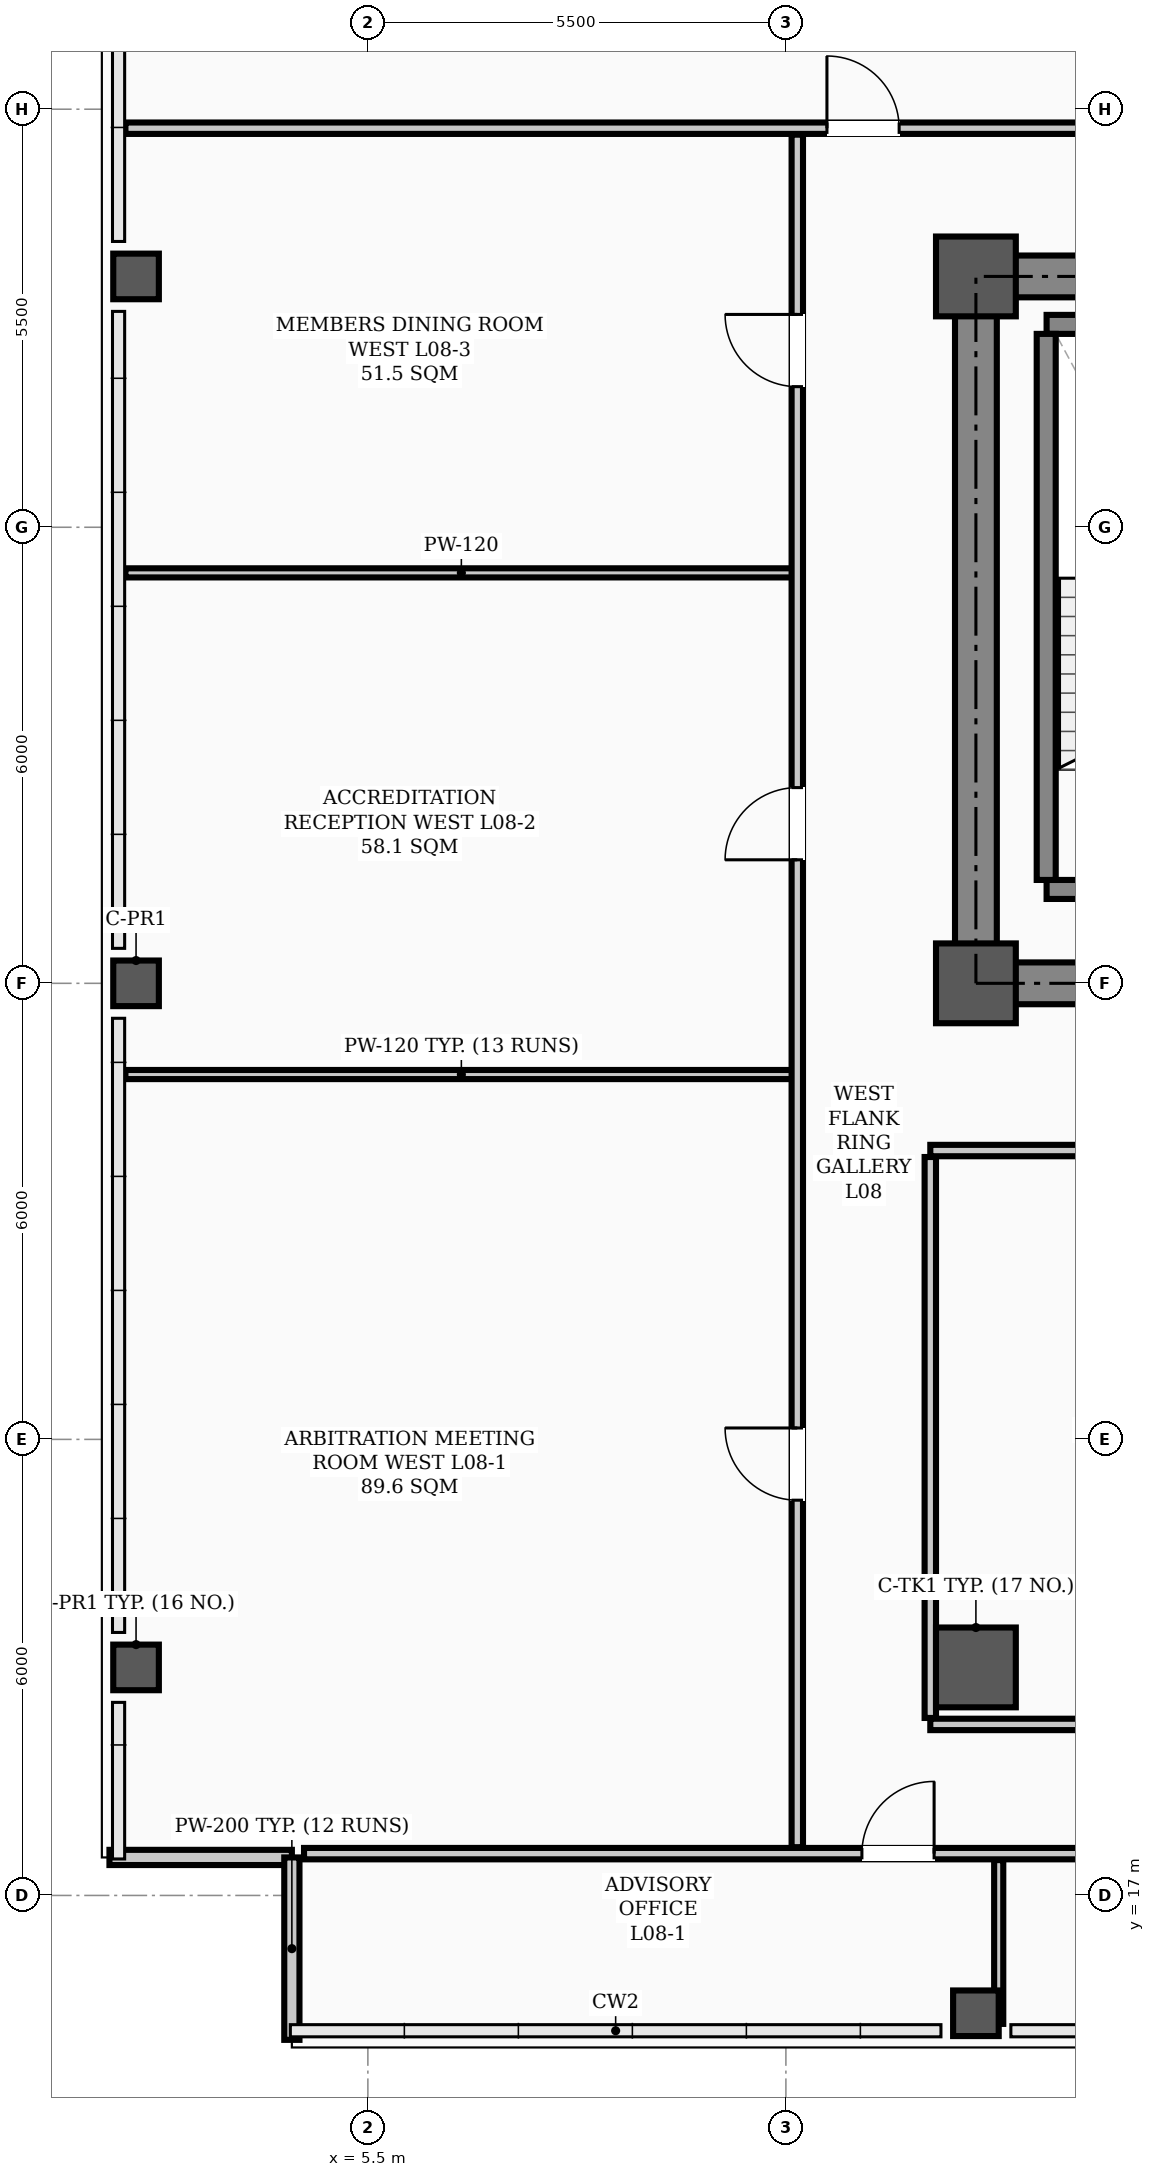
"""IFC4 building model, lengths in metres.
Left out: names, types, materials, properties, quantities, classifications, styles, units other than length and angle.
Written with IfcOpenShell. Run it as: python <this file> out.ifc"""

import sys

from ifc_helpers import new_model, si_unit, direction, frame, frame_2d, origin, origin_2d, place, context, subcontext, project, spatial, rectangle, hollow_rectangle, extrude, element, fill, save


model = new_model("IFC4")
c1 = context("Model", 3, precision=1e-05, world=origin(), true_north=direction((0.0, 1.0)))
c2 = subcontext(c1, "Body", "Model", "MODEL_VIEW")
j1 = project(units=[si_unit("LENGTHUNIT", "METRE"), si_unit("PLANEANGLEUNIT", "RADIAN")], contexts=[c1])
p1 = place(None, origin())
s1 = spatial("IfcSite", under=j1, at=p1, CompositionType="ELEMENT")
p2 = place(p1, origin())
s2 = spatial("IfcBuilding", under=s1, at=p2, CompositionType="ELEMENT")
p3 = place(p2, frame((0.0, 0.0, 34.3)))
s3 = spatial("IfcBuildingStorey", under=s2, at=p3, CompositionType="ELEMENT", Elevation=34.3)
for number, where, z_axis, x_axis in (
    (1, (13.5, 29.0, 0.0), (0.0, 0.0, 1.0), (1.0, 0.0, 0.0)),
    (2, (13.5, 38.3, 0.0), (0.0, 0.0, 1.0), (1.0, 0.0, 0.0)),
    (3, (13.5, 20.0, 0.0), (0.0, 0.0, 1.0), (1.0, 0.0, 0.0)),
):
    element("IfcColumn", number, at=place(p3, frame(where, z_axis=z_axis, x_axis=x_axis)), inside=s3, PredefinedType="COLUMN", context=c2, shape_type="SweptSolid", body=[
        extrude(hollow_rectangle(XDim=1.05, YDim=1.05, WallThickness=0.038, InnerFilletRadius=0.019, OuterFilletRadius=0.057, at=origin_2d()), origin(), (0.0, 0.0, 1.0), 3.9),
    ])
for number, where, z_axis, x_axis in (
    (4, (2.45, 20.0, 0.0), (0.0, 0.0, 1.0), (1.0, 0.0, 0.0)),
    (5, (2.45, 29.0, 0.0), (0.0, 0.0, 1.0), (1.0, 0.0, 0.0)),
    (6, (2.45, 38.3, 0.0), (0.0, 0.0, 1.0), (1.0, 0.0, 0.0)),
    (7, (13.5, 15.45, 0.0), (0.0, 0.0, 1.0), (1.0, 0.0, 0.0)),
):
    element("IfcColumn", number, at=place(p3, frame(where, z_axis=z_axis, x_axis=x_axis)), inside=s3, PredefinedType="COLUMN", context=c2, shape_type="SweptSolid", body=[
        extrude(hollow_rectangle(XDim=0.6, YDim=0.6, WallThickness=0.026, InnerFilletRadius=0.013, OuterFilletRadius=0.039, at=origin_2d()), origin(), (0.0, 0.0, 1.0), 3.9),
    ])
for number, where, z_axis, x_axis in (
    (8, (2.1, 17.5, 0.0), (0.0, 0.0, 1.0), (1.0, 0.0, 0.0)),
    (9, (4.5, 17.5, 0.0), (0.0, 0.0, 1.0), (0.0, -1.0, 0.0)),
):
    element("IfcWall", number, at=place(p3, frame(where, z_axis=z_axis, x_axis=x_axis)), inside=s3, PredefinedType="PARAPET", context=c2, shape_type="SweptSolid", body=[
        extrude(rectangle(XDim=2.4, YDim=0.2, at=frame_2d((1.2, 0.0))), origin(), (0.0, 0.0, 1.0), 1.2),
    ])
p4 = place(p3, frame((13.5, 29.0, 0.0), z_axis=(0.0, 0.0, 1.0), x_axis=(1.0, 0.0, 0.0)))
e10 = element("IfcWall", 10, at=p4, inside=s3, PredefinedType="SHEAR", context=c2, shape_type="SweptSolid", body=[
    extrude(rectangle(XDim=30.5, YDim=0.55, at=frame_2d((15.25, 0.0))), origin(), (0.0, 0.0, 1.0), 3.72),
])
p5 = place(p4, frame((1.75, 0.0, 0.0)))
e11 = element("IfcOpeningElement", 11, at=p5, cuts=e10, PredefinedType="OPENING", context=c2, shape_type="SweptSolid", body=[
    extrude(rectangle(XDim=1.1, YDim=2.08, at=frame_2d((0.55, 1.04))), frame((0.0, 0.285, 0.0), z_axis=(0.0, -1.0, 0.0), x_axis=(1.0, 0.0, 0.0)), (0.0, 0.0, 1.0), 0.57),
])
p6 = place(p4, frame((26.7, 0.0, 0.0)))
e12 = element("IfcOpeningElement", 12, at=p6, cuts=e10, PredefinedType="OPENING", context=c2, shape_type="SweptSolid", body=[
    extrude(rectangle(XDim=1.1, YDim=2.08, at=frame_2d((0.55, 1.04))), frame((0.0, 0.285, 0.0), z_axis=(0.0, -1.0, 0.0), x_axis=(1.0, 0.0, 0.0)), (0.0, 0.0, 1.0), 0.57),
])
p7 = place(p4, frame((6.8, 0.0, 0.0)))
e13 = element("IfcOpeningElement", 13, at=p7, cuts=e10, PredefinedType="OPENING", context=c2, shape_type="SweptSolid", body=[
    extrude(rectangle(XDim=1.1, YDim=2.08, at=frame_2d((0.55, 1.04))), frame((0.0, 0.285, 0.0), z_axis=(0.0, -1.0, 0.0), x_axis=(1.0, 0.0, 0.0)), (0.0, 0.0, 1.0), 0.57),
])
p8 = place(p4, frame((13.2, 0.0, 0.0)))
e14 = element("IfcOpeningElement", 14, at=p8, cuts=e10, PredefinedType="OPENING", context=c2, shape_type="SweptSolid", body=[
    extrude(rectangle(XDim=1.6, YDim=2.08, at=frame_2d((0.8, 1.04))), frame((0.0, 0.285, 0.0), z_axis=(0.0, -1.0, 0.0), x_axis=(1.0, 0.0, 0.0)), (0.0, 0.0, 1.0), 0.57),
])
p9 = place(p4, frame((19.53, 0.0, 0.0)))
e15 = element("IfcOpeningElement", 15, at=p9, cuts=e10, PredefinedType="OPENING", context=c2, shape_type="SweptSolid", body=[
    extrude(rectangle(XDim=0.9, YDim=2.08, at=frame_2d((0.45, 1.04))), frame((0.0, 0.285, 0.0), z_axis=(0.0, -1.0, 0.0), x_axis=(1.0, 0.0, 0.0)), (0.0, 0.0, 1.0), 0.57),
])
p10 = place(p4, frame((21.57, 0.0, 0.0)))
e16 = element("IfcOpeningElement", 16, at=p10, cuts=e10, PredefinedType="OPENING", context=c2, shape_type="SweptSolid", body=[
    extrude(rectangle(XDim=0.9, YDim=2.08, at=frame_2d((0.45, 1.04))), frame((0.0, 0.285, 0.0), z_axis=(0.0, -1.0, 0.0), x_axis=(1.0, 0.0, 0.0)), (0.0, 0.0, 1.0), 0.57),
])
p11 = place(p3, frame((13.5, 38.3, 0.0), z_axis=(0.0, 0.0, 1.0), x_axis=(1.0, 0.0, 0.0)))
e17 = element("IfcWall", 17, at=p11, inside=s3, PredefinedType="SHEAR", context=c2, shape_type="SweptSolid", body=[
    extrude(rectangle(XDim=30.5, YDim=0.55, at=frame_2d((15.25, 0.0))), origin(), (0.0, 0.0, 1.0), 3.72),
])
p12 = place(p3, frame((13.5, 29.35, 0.0), z_axis=(0.0, 0.0, 1.0), x_axis=(0.0, 1.0, 0.0)))
e18 = element("IfcWall", 18, at=p12, inside=s3, PredefinedType="SHEAR", context=c2, shape_type="SweptSolid", body=[
    extrude(rectangle(XDim=8.6, YDim=0.55, at=frame_2d((4.3, 0.0))), origin(), (0.0, 0.0, 1.0), 3.72),
])
p13 = place(p3, frame((14.43, 30.235, 0.0), z_axis=(0.0, 0.0, 1.0), x_axis=(1.0, 0.0, 0.0)))
e19 = element("IfcWall", 19, at=p13, inside=s3, PredefinedType="STANDARD", context=c2, shape_type="SweptSolid", body=[
    extrude(rectangle(XDim=3.34, YDim=0.25, at=frame_2d((1.67, 0.0))), origin(), (0.0, 0.0, 1.0), 3.72),
])
p14 = place(p13, frame((1.1, 0.0, 0.0)))
e20 = element("IfcOpeningElement", 20, at=p14, cuts=e19, PredefinedType="OPENING", context=c2, shape_type="SweptSolid", body=[
    extrude(rectangle(XDim=1.1, YDim=2.08, at=frame_2d((0.55, 1.04))), frame((0.0, 0.135, 0.0), z_axis=(0.0, -1.0, 0.0), x_axis=(1.0, 0.0, 0.0)), (0.0, 0.0, 1.0), 0.27),
])
p15 = place(p3, frame((14.43, 37.669, 0.0), z_axis=(0.0, 0.0, 1.0), x_axis=(1.0, 0.0, 0.0)))
e21 = element("IfcWall", 21, at=p15, inside=s3, PredefinedType="STANDARD", context=c2, shape_type="SweptSolid", body=[
    extrude(rectangle(XDim=3.34, YDim=0.25, at=frame_2d((1.67, 0.0))), origin(), (0.0, 0.0, 1.0), 3.72),
])
p16 = place(p3, frame((14.425, 30.36, 0.0), z_axis=(0.0, 0.0, 1.0), x_axis=(0.0, 1.0, 0.0)))
e22 = element("IfcWall", 22, at=p16, inside=s3, PredefinedType="STANDARD", context=c2, shape_type="SweptSolid", body=[
    extrude(rectangle(XDim=7.184, YDim=0.25, at=frame_2d((3.592, 0.0))), origin(), (0.0, 0.0, 1.0), 3.72),
])
p17 = place(p3, frame((12.9, 26.8, 0.0), z_axis=(0.0, 0.0, 1.0), x_axis=(1.0, 0.0, 0.0)))
e23 = element("IfcWall", 23, at=p17, inside=s3, PredefinedType="PARTITIONING", context=c2, shape_type="SweptSolid", body=[
    extrude(rectangle(XDim=31.7, YDim=0.15, at=frame_2d((15.85, 0.0))), origin(), (0.0, 0.0, 1.0), 3.1),
])
p18 = place(p17, frame((13.6, 0.0, 0.0)))
e24 = element("IfcOpeningElement", 24, at=p18, cuts=e23, PredefinedType="OPENING", context=c2, shape_type="SweptSolid", body=[
    extrude(rectangle(XDim=1.6, YDim=2.08, at=frame_2d((0.8, 1.04))), frame((0.0, 0.085, 0.0), z_axis=(0.0, -1.0, 0.0), x_axis=(1.0, 0.0, 0.0)), (0.0, 0.0, 1.0), 0.17),
])
p19 = place(p17, frame((2.875, 0.0, 0.0)))
e25 = element("IfcOpeningElement", 25, at=p19, cuts=e23, PredefinedType="OPENING", context=c2, shape_type="SweptSolid", body=[
    extrude(rectangle(XDim=0.95, YDim=2.08, at=frame_2d((0.475, 1.04))), frame((0.0, 0.085, 0.0), z_axis=(0.0, -1.0, 0.0), x_axis=(1.0, 0.0, 0.0)), (0.0, 0.0, 1.0), 0.17),
])
p20 = place(p17, frame((8.625, 0.0, 0.0)))
e26 = element("IfcOpeningElement", 26, at=p20, cuts=e23, PredefinedType="OPENING", context=c2, shape_type="SweptSolid", body=[
    extrude(rectangle(XDim=0.95, YDim=2.08, at=frame_2d((0.475, 1.04))), frame((0.0, 0.085, 0.0), z_axis=(0.0, -1.0, 0.0), x_axis=(1.0, 0.0, 0.0)), (0.0, 0.0, 1.0), 0.17),
])
p21 = place(p17, frame((16.075, 0.0, 0.0)))
e27 = element("IfcOpeningElement", 27, at=p21, cuts=e23, PredefinedType="OPENING", context=c2, shape_type="SweptSolid", body=[
    extrude(rectangle(XDim=0.95, YDim=2.08, at=frame_2d((0.475, 1.04))), frame((0.0, 0.085, 0.0), z_axis=(0.0, -1.0, 0.0), x_axis=(1.0, 0.0, 0.0)), (0.0, 0.0, 1.0), 0.17),
])
p22 = place(p17, frame((21.875, 0.0, 0.0)))
e28 = element("IfcOpeningElement", 28, at=p22, cuts=e23, PredefinedType="OPENING", context=c2, shape_type="SweptSolid", body=[
    extrude(rectangle(XDim=0.95, YDim=2.08, at=frame_2d((0.475, 1.04))), frame((0.0, 0.085, 0.0), z_axis=(0.0, -1.0, 0.0), x_axis=(1.0, 0.0, 0.0)), (0.0, 0.0, 1.0), 0.17),
])
p23 = place(p17, frame((29.025, 0.0, 0.0)))
e29 = element("IfcOpeningElement", 29, at=p23, cuts=e23, PredefinedType="OPENING", context=c2, shape_type="SweptSolid", body=[
    extrude(rectangle(XDim=0.95, YDim=2.08, at=frame_2d((0.475, 1.04))), frame((0.0, 0.085, 0.0), z_axis=(0.0, -1.0, 0.0), x_axis=(1.0, 0.0, 0.0)), (0.0, 0.0, 1.0), 0.17),
])
p24 = place(p3, frame((4.66, 17.55, 0.0), z_axis=(0.0, 0.0, 1.0), x_axis=(1.0, 0.0, 0.0)))
e30 = element("IfcWall", 30, at=p24, inside=s3, PredefinedType="PARTITIONING", context=c2, shape_type="SweptSolid", body=[
    extrude(rectangle(XDim=44.68, YDim=0.15, at=frame_2d((22.34, 0.0))), origin(), (0.0, 0.0, 1.0), 3.1),
])
p25 = place(p24, frame((7.34, 0.0, 0.0)))
e31 = element("IfcOpeningElement", 31, at=p25, cuts=e30, PredefinedType="OPENING", context=c2, shape_type="SweptSolid", body=[
    extrude(rectangle(XDim=0.95, YDim=2.08, at=frame_2d((0.475, 1.04))), frame((0.0, 0.085, 0.0), z_axis=(0.0, -1.0, 0.0), x_axis=(1.0, 0.0, 0.0)), (0.0, 0.0, 1.0), 0.17),
])
p26 = place(p24, frame((12.465, 0.0, 0.0)))
e32 = element("IfcOpeningElement", 32, at=p26, cuts=e30, PredefinedType="OPENING", context=c2, shape_type="SweptSolid", body=[
    extrude(rectangle(XDim=0.95, YDim=2.08, at=frame_2d((0.475, 1.04))), frame((0.0, 0.085, 0.0), z_axis=(0.0, -1.0, 0.0), x_axis=(1.0, 0.0, 0.0)), (0.0, 0.0, 1.0), 0.17),
])
p27 = place(p24, frame((29.265, 0.0, 0.0)))
e33 = element("IfcOpeningElement", 33, at=p27, cuts=e30, PredefinedType="OPENING", context=c2, shape_type="SweptSolid", body=[
    extrude(rectangle(XDim=0.95, YDim=2.08, at=frame_2d((0.475, 1.04))), frame((0.0, 0.085, 0.0), z_axis=(0.0, -1.0, 0.0), x_axis=(1.0, 0.0, 0.0)), (0.0, 0.0, 1.0), 0.17),
])
p28 = place(p24, frame((37.265, 0.0, 0.0)))
e34 = element("IfcOpeningElement", 34, at=p28, cuts=e30, PredefinedType="OPENING", context=c2, shape_type="SweptSolid", body=[
    extrude(rectangle(XDim=0.95, YDim=2.08, at=frame_2d((0.475, 1.04))), frame((0.0, 0.085, 0.0), z_axis=(0.0, -1.0, 0.0), x_axis=(1.0, 0.0, 0.0)), (0.0, 0.0, 1.0), 0.17),
])
p29 = place(p3, frame((12.9, 19.25, 0.0), z_axis=(0.0, 0.0, 1.0), x_axis=(1.0, 0.0, 0.0)))
e35 = element("IfcWall", 35, at=p29, inside=s3, PredefinedType="PARTITIONING", context=c2, shape_type="SweptSolid", body=[
    extrude(rectangle(XDim=13.3, YDim=0.15, at=frame_2d((6.65, 0.0))), origin(), (0.0, 0.0, 1.0), 3.1),
])
for number, where, z_axis, x_axis in (
    (36, (2.31, 27.8, 0.0), (0.0, 0.0, 1.0), (1.0, 0.0, 0.0)),
    (37, (2.31, 34.4, 0.0), (0.0, 0.0, 1.0), (1.0, 0.0, 0.0)),
):
    element("IfcWall", number, at=place(p3, frame(where, z_axis=z_axis, x_axis=x_axis)), inside=s3, PredefinedType="PARTITIONING", context=c2, shape_type="SweptSolid", body=[
        extrude(rectangle(XDim=8.84, YDim=0.12, at=frame_2d((4.42, 0.0))), origin(), (0.0, 0.0, 1.0), 3.212),
    ])
p30 = place(p3, frame((2.31, 40.25, 0.0), z_axis=(0.0, 0.0, 1.0), x_axis=(1.0, 0.0, 0.0)))
e38 = element("IfcWall", 38, at=p30, inside=s3, PredefinedType="PARTITIONING", context=c2, shape_type="SweptSolid", body=[
    extrude(rectangle(XDim=49.38, YDim=0.15, at=frame_2d((24.69, 0.0))), origin(), (0.0, 0.0, 1.0), 3.1),
])
p31 = place(p30, frame((9.23, 0.0, 0.0)))
e39 = element("IfcOpeningElement", 39, at=p31, cuts=e38, PredefinedType="OPENING", context=c2, shape_type="SweptSolid", body=[
    extrude(rectangle(XDim=0.95, YDim=2.08, at=frame_2d((0.475, 1.04))), frame((0.0, 0.085, 0.0), z_axis=(0.0, -1.0, 0.0), x_axis=(1.0, 0.0, 0.0)), (0.0, 0.0, 1.0), 0.17),
])
p32 = place(p30, frame((23.115, 0.0, 0.0)))
e40 = element("IfcOpeningElement", 40, at=p32, cuts=e38, PredefinedType="OPENING", context=c2, shape_type="SweptSolid", body=[
    extrude(rectangle(XDim=0.95, YDim=2.08, at=frame_2d((0.475, 1.04))), frame((0.0, 0.085, 0.0), z_axis=(0.0, -1.0, 0.0), x_axis=(1.0, 0.0, 0.0)), (0.0, 0.0, 1.0), 0.17),
])
p33 = place(p30, frame((31.515, 0.0, 0.0)))
e41 = element("IfcOpeningElement", 41, at=p33, cuts=e38, PredefinedType="OPENING", context=c2, shape_type="SweptSolid", body=[
    extrude(rectangle(XDim=0.95, YDim=2.08, at=frame_2d((0.475, 1.04))), frame((0.0, 0.085, 0.0), z_axis=(0.0, -1.0, 0.0), x_axis=(1.0, 0.0, 0.0)), (0.0, 0.0, 1.0), 0.17),
])
p34 = place(p30, frame((42.7, 0.0, 0.0)))
e42 = element("IfcOpeningElement", 42, at=p34, cuts=e38, PredefinedType="OPENING", context=c2, shape_type="SweptSolid", body=[
    extrude(rectangle(XDim=0.95, YDim=2.08, at=frame_2d((0.475, 1.04))), frame((0.0, 0.085, 0.0), z_axis=(0.0, -1.0, 0.0), x_axis=(1.0, 0.0, 0.0)), (0.0, 0.0, 1.0), 0.17),
])
p35 = place(p3, frame((11.15, 17.635, 0.0), z_axis=(0.0, 0.0, 1.0), x_axis=(0.0, 1.0, 0.0)))
e43 = element("IfcWall", 43, at=p35, inside=s3, PredefinedType="PARTITIONING", context=c2, shape_type="SweptSolid", body=[
    extrude(rectangle(XDim=22.53, YDim=0.15, at=frame_2d((11.265, 0.0))), origin(), (0.0, 0.0, 1.0), 3.0),
])
p36 = place(p35, frame((4.565, 0.0, 0.0)))
e44 = element("IfcOpeningElement", 44, at=p36, cuts=e43, PredefinedType="OPENING", context=c2, shape_type="SweptSolid", body=[
    extrude(rectangle(XDim=0.95, YDim=2.08, at=frame_2d((0.475, 1.04))), frame((0.0, 0.085, 0.0), z_axis=(0.0, -1.0, 0.0), x_axis=(1.0, 0.0, 0.0)), (0.0, 0.0, 1.0), 0.17),
])
p37 = place(p35, frame((12.99, 0.0, 0.0)))
e45 = element("IfcOpeningElement", 45, at=p37, cuts=e43, PredefinedType="OPENING", context=c2, shape_type="SweptSolid", body=[
    extrude(rectangle(XDim=0.95, YDim=2.08, at=frame_2d((0.475, 1.04))), frame((0.0, 0.085, 0.0), z_axis=(0.0, -1.0, 0.0), x_axis=(1.0, 0.0, 0.0)), (0.0, 0.0, 1.0), 0.17),
])
p38 = place(p35, frame((19.215, 0.0, 0.0)))
e46 = element("IfcOpeningElement", 46, at=p38, cuts=e43, PredefinedType="OPENING", context=c2, shape_type="SweptSolid", body=[
    extrude(rectangle(XDim=0.95, YDim=2.08, at=frame_2d((0.475, 1.04))), frame((0.0, 0.085, 0.0), z_axis=(0.0, -1.0, 0.0), x_axis=(1.0, 0.0, 0.0)), (0.0, 0.0, 1.0), 0.17),
])
p39 = place(p3, frame((12.9, 19.335, 0.0), z_axis=(0.0, 0.0, 1.0), x_axis=(0.0, 1.0, 0.0)))
e47 = element("IfcWall", 47, at=p39, inside=s3, PredefinedType="PARTITIONING", context=c2, shape_type="SweptSolid", body=[
    extrude(rectangle(XDim=7.38, YDim=0.15, at=frame_2d((3.69, 0.0))), origin(), (0.0, 0.0, 1.0), 3.0),
])
p40 = place(p3, frame((13.8, 15.31, 0.0), z_axis=(0.0, 0.0, 1.0), x_axis=(0.0, 1.0, 0.0)))
e48 = element("IfcWall", 48, at=p40, inside=s3, PredefinedType="PARTITIONING", context=c2, shape_type="SweptSolid", body=[
    extrude(rectangle(XDim=2.155, YDim=0.12, at=frame_2d((1.078, 0.0))), origin(), (0.0, 0.0, 1.0), 3.1),
])
p41 = place(p25, origin())
e49 = element("IfcDoor", 49, at=p41, inside=s3, OperationType="SINGLE_SWING_RIGHT", PredefinedType="DOOR", context=c2, shape_type="SweptSolid", body=[
    extrude(rectangle(XDim=0.95, YDim=2.08, at=frame_2d((0.475, 1.04))), frame((0.0, 0.025, 0.0), z_axis=(0.0, -1.0, 0.0), x_axis=(1.0, 0.0, 0.0)), (0.0, 0.0, 1.0), 0.05),
])
fill(e31, e49)
p42 = place(p36, origin())
e50 = element("IfcDoor", 50, at=p42, inside=s3, OperationType="SINGLE_SWING_RIGHT", PredefinedType="DOOR", context=c2, shape_type="SweptSolid", body=[
    extrude(rectangle(XDim=0.95, YDim=2.08, at=frame_2d((0.475, 1.04))), frame((0.0, 0.025, 0.0), z_axis=(0.0, -1.0, 0.0), x_axis=(1.0, 0.0, 0.0)), (0.0, 0.0, 1.0), 0.05),
])
fill(e44, e50)
p43 = place(p37, origin())
e51 = element("IfcDoor", 51, at=p43, inside=s3, OperationType="SINGLE_SWING_LEFT", PredefinedType="DOOR", context=c2, shape_type="SweptSolid", body=[
    extrude(rectangle(XDim=0.95, YDim=2.08, at=frame_2d((0.475, 1.04))), frame((0.0, 0.025, 0.0), z_axis=(0.0, -1.0, 0.0), x_axis=(1.0, 0.0, 0.0)), (0.0, 0.0, 1.0), 0.05),
])
fill(e45, e51)
p44 = place(p38, origin())
e52 = element("IfcDoor", 52, at=p44, inside=s3, OperationType="SINGLE_SWING_RIGHT", PredefinedType="DOOR", context=c2, shape_type="SweptSolid", body=[
    extrude(rectangle(XDim=0.95, YDim=2.08, at=frame_2d((0.475, 1.04))), frame((0.0, 0.025, 0.0), z_axis=(0.0, -1.0, 0.0), x_axis=(1.0, 0.0, 0.0)), (0.0, 0.0, 1.0), 0.05),
])
fill(e46, e52)
p45 = place(p31, origin())
e53 = element("IfcDoor", 53, at=p45, inside=s3, OperationType="SINGLE_SWING_LEFT", PredefinedType="DOOR", context=c2, shape_type="SweptSolid", body=[
    extrude(rectangle(XDim=0.95, YDim=2.08, at=frame_2d((0.475, 1.04))), frame((0.0, 0.025, 0.0), z_axis=(0.0, -1.0, 0.0), x_axis=(1.0, 0.0, 0.0)), (0.0, 0.0, 1.0), 0.05),
])
fill(e39, e53)
save(model, sys.argv[1])
